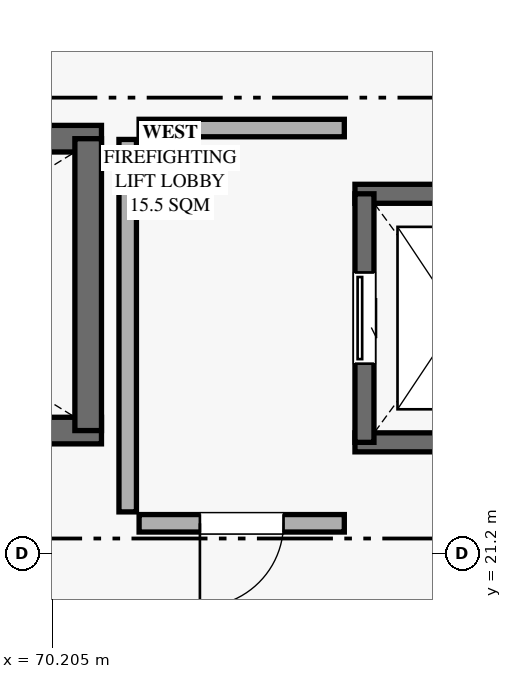
"""IFC4 building model, lengths in metres.
Left out: names, types, materials, properties, quantities, classifications, styles, units other than length and angle.
Written with IfcOpenShell. Run it as: python <this file> out.ifc"""

import sys

from ifc_helpers import new_model, si_unit, direction, frame, frame_2d, origin, place, context, subcontext, project, spatial, rectangle, extrude, element, fill, save


model = new_model("IFC4")
c1 = context("Model", 3, precision=1e-05, world=origin(), true_north=direction((0.0, 1.0)))
c2 = subcontext(c1, "Body", "Model", "MODEL_VIEW")
j1 = project(units=[si_unit("LENGTHUNIT", "METRE"), si_unit("PLANEANGLEUNIT", "RADIAN")], contexts=[c1])
p1 = place(None, origin())
s1 = spatial("IfcSite", under=j1, at=p1, CompositionType="ELEMENT")
p2 = place(p1, origin())
s2 = spatial("IfcBuilding", under=s1, at=p2, CompositionType="ELEMENT")
p3 = place(p2, frame((0.0, 0.0, 5.4)))
s3 = spatial("IfcBuildingStorey", under=s2, at=p3, CompositionType="ELEMENT", Elevation=5.4)
for number, where, z_axis, x_axis in (
    (1, (70.855, 22.82, 0.0), (0.0, 0.0, 1.0), (-1.0, 0.0, 0.0)),
    (2, (62.845, 26.66, 0.0), (0.0, 0.0, 1.0), (1.0, 0.0, 0.0)),
):
    element("IfcWall", number, at=place(p3, frame(where, z_axis=z_axis, x_axis=x_axis)), inside=s3, PredefinedType="SHEAR", context=c2, shape_type="SweptSolid", body=[
        extrude(rectangle(XDim=8.01, YDim=0.35, at=frame_2d((4.005, 0.0))), origin(), (0.0, 0.0, 1.0), 4.77),
    ])
p4 = place(p3, frame((70.68, 26.66, 0.0), z_axis=(0.0, 0.0, 1.0), x_axis=(0.0, -1.0, 0.0)))
e3 = element("IfcWall", 3, at=p4, inside=s3, PredefinedType="SHEAR", context=c2, shape_type="SweptSolid", body=[
    extrude(rectangle(XDim=3.84, YDim=0.35, at=frame_2d((1.92, 0.0))), origin(), (0.0, 0.0, 1.0), 4.77),
])
for number, where, z_axis, x_axis in (
    (4, (76.91, 22.665, 0.0), (0.0, 0.0, 1.0), (-1.0, 0.0, 0.0)),
    (5, (74.19, 25.935, 0.0), (0.0, 0.0, 1.0), (1.0, 0.0, 0.0)),
):
    element("IfcWall", number, at=place(p3, frame(where, z_axis=z_axis, x_axis=x_axis)), inside=s3, PredefinedType="SHEAR", context=c2, shape_type="SweptSolid", body=[
        extrude(rectangle(XDim=2.72, YDim=0.25, at=frame_2d((1.36, 0.0))), origin(), (0.0, 0.0, 1.0), 4.77),
    ])
p5 = place(p3, frame((74.315, 22.665, 0.0), z_axis=(0.0, 0.0, 1.0), x_axis=(0.0, 1.0, 0.0)))
e6 = element("IfcWall", 6, at=p5, inside=s3, PredefinedType="SHEAR", context=c2, shape_type="SweptSolid", body=[
    extrude(rectangle(XDim=3.27, YDim=0.25, at=frame_2d((1.635, 0.0))), origin(), (0.0, 0.0, 1.0), 4.77),
])
p6 = place(p5, frame((1.035, 0.0, 0.0)))
e7 = element("IfcOpeningElement", 7, at=p6, cuts=e6, PredefinedType="OPENING", context=c2, shape_type="SweptSolid", body=[
    extrude(rectangle(XDim=1.2, YDim=2.25, at=frame_2d((0.6, 1.125))), frame((0.0, 0.135, 0.0), z_axis=(0.0, -1.0, 0.0), x_axis=(1.0, 0.0, 0.0)), (0.0, 0.0, 1.0), 0.27),
])
p7 = place(p3, frame((74.05, 21.6, 0.0), z_axis=(0.0, 0.0, 1.0), x_axis=(-1.0, 0.0, 0.0)))
e8 = element("IfcWall", 8, at=p7, inside=s3, PredefinedType="PARTITIONING", context=c2, shape_type="SweptSolid", body=[
    extrude(rectangle(XDim=2.7, YDim=0.23, at=frame_2d((1.35, 0.0))), origin(), (0.0, 0.0, 1.0), 3.52),
])
p8 = place(p7, frame((0.8, 0.0, 0.0)))
e9 = element("IfcOpeningElement", 9, at=p8, cuts=e8, PredefinedType="OPENING", context=c2, shape_type="SweptSolid", body=[
    extrude(rectangle(XDim=1.1, YDim=2.18, at=frame_2d((0.55, 1.09))), frame((0.0, 0.125, 0.0), z_axis=(0.0, -1.0, 0.0), x_axis=(1.0, 0.0, 0.0)), (0.0, 0.0, 1.0), 0.25),
])
p9 = place(p3, frame((71.35, 26.8, 0.0), z_axis=(0.0, 0.0, 1.0), x_axis=(1.0, 0.0, 0.0)))
e10 = element("IfcWall", 10, at=p9, inside=s3, PredefinedType="PARTITIONING", context=c2, shape_type="SweptSolid", body=[
    extrude(rectangle(XDim=2.7, YDim=0.23, at=frame_2d((1.35, 0.0))), origin(), (0.0, 0.0, 1.0), 3.52),
])
p10 = place(p3, frame((71.2, 21.75, 0.0), z_axis=(0.0, 0.0, 1.0), x_axis=(0.0, 1.0, 0.0)))
e11 = element("IfcWall", 11, at=p10, inside=s3, PredefinedType="PARTITIONING", context=c2, shape_type="SweptSolid", body=[
    extrude(rectangle(XDim=4.9, YDim=0.23, at=frame_2d((2.45, 0.0))), origin(), (0.0, 0.0, 1.0), 3.52),
])
p11 = place(p6, origin())
e12 = element("IfcDoor", 12, at=p11, inside=s3, OperationType="SLIDING_TO_LEFT", PredefinedType="DOOR", context=c2, shape_type="SweptSolid", body=[
    extrude(rectangle(XDim=1.2, YDim=2.25, at=frame_2d((0.6, 1.125))), frame((0.0, 0.025, 0.0), z_axis=(0.0, -1.0, 0.0), x_axis=(1.0, 0.0, 0.0)), (0.0, 0.0, 1.0), 0.05),
])
fill(e7, e12)
p12 = place(p8, origin())
e13 = element("IfcDoor", 13, at=p12, inside=s3, OperationType="SINGLE_SWING_RIGHT", PredefinedType="DOOR", context=c2, shape_type="SweptSolid", body=[
    extrude(rectangle(XDim=1.1, YDim=2.18, at=frame_2d((0.55, 1.09))), frame((0.0, 0.025, 0.0), z_axis=(0.0, -1.0, 0.0), x_axis=(1.0, 0.0, 0.0)), (0.0, 0.0, 1.0), 0.05),
])
fill(e9, e13)
save(model, sys.argv[1])
